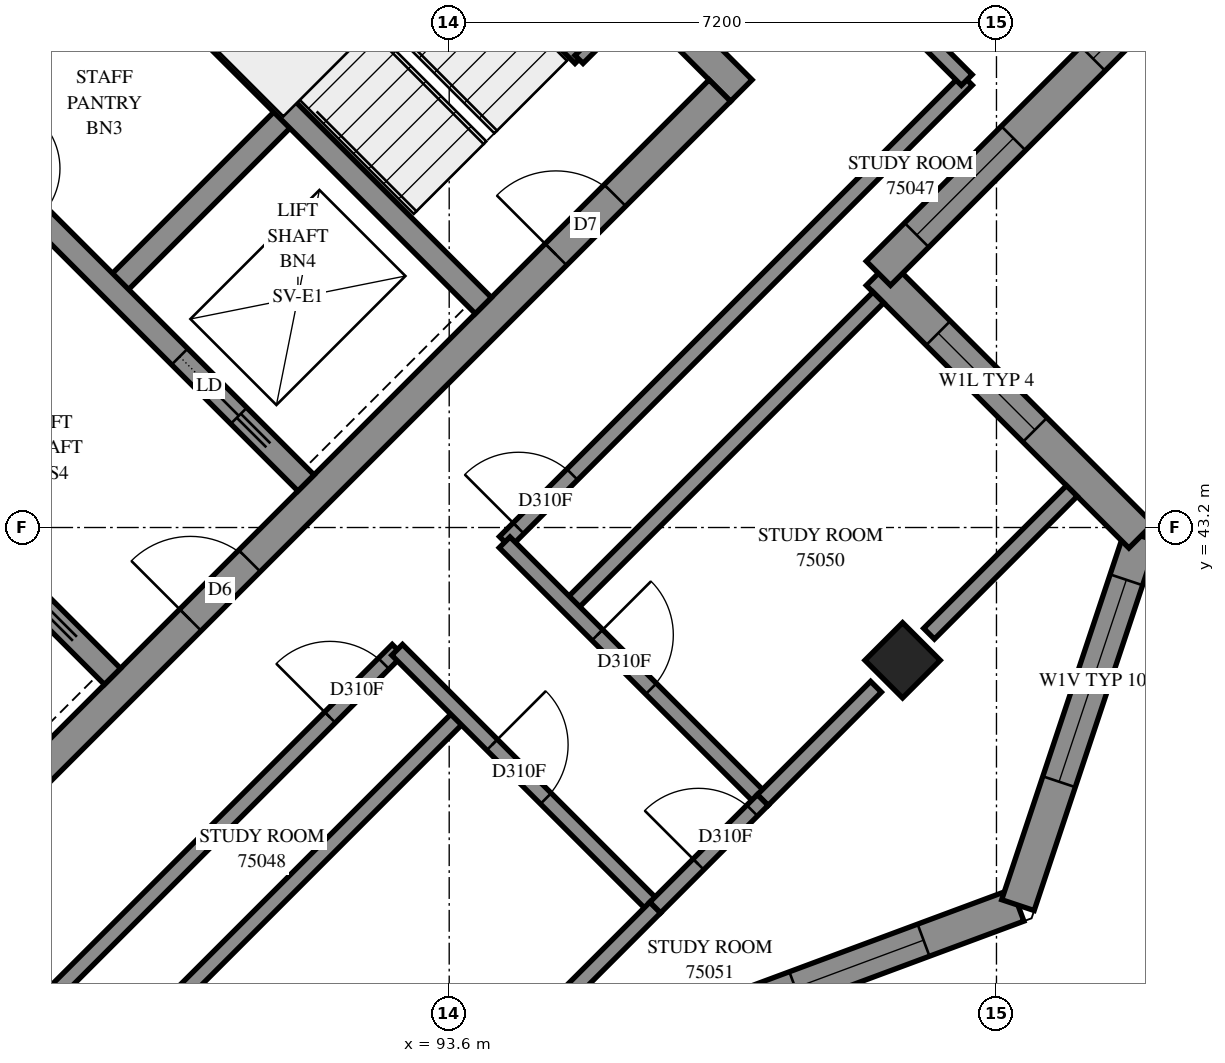
"""IFC4 building model, lengths in metres.
Left out: names, types, materials, properties, quantities, classifications, styles, units other than length and angle.
Written with IfcOpenShell. Run it as: python <this file> out.ifc"""

import sys

from ifc_helpers import new_model, si_unit, direction, frame, frame_2d, origin, origin_2d, place, context, subcontext, project, spatial, polyline, rectangle, outline, extrude, element, fill, save


model = new_model("IFC4")
c1 = context("Model", 3, precision=1e-05, world=origin(), true_north=direction((0.0, 1.0)))
c2 = subcontext(c1, "Body", "Model", "MODEL_VIEW")
j1 = project(units=[si_unit("LENGTHUNIT", "METRE"), si_unit("PLANEANGLEUNIT", "RADIAN")], contexts=[c1])
p1 = place(None, origin())
s1 = spatial("IfcSite", under=j1, at=p1, CompositionType="ELEMENT")
p2 = place(p1, origin())
s2 = spatial("IfcBuilding", under=s1, at=p2, CompositionType="ELEMENT")
p3 = place(p2, frame((0.0, 0.0, 274.4)))
s3 = spatial("IfcBuildingStorey", under=s2, at=p3, CompositionType="ELEMENT", Elevation=274.4)
p4 = place(p3, frame((99.565, 41.453, 0.0), z_axis=(0.0, 0.0, 1.0), x_axis=(0.7071067812, -0.7071067812, 0.0)))
e1 = element("IfcColumn", 1, at=p4, inside=s3, PredefinedType="COLUMN", context=c2, shape_type="SweptSolid", body=[
    extrude(rectangle(XDim=0.7, YDim=0.7, at=origin_2d()), origin(), (0.0, 0.0, 1.0), 3.1),
])
p5 = place(p3, frame((86.695, 59.696, -0.3), z_axis=(0.0, 0.0, 1.0), x_axis=(0.7071100706, -0.7071034917, 0.0)))
e2 = element("IfcWall", 2, at=p5, inside=s3, PredefinedType="SHEAR", context=c2, shape_type="SweptSolid", body=[
    extrude(rectangle(XDim=15.2, YDim=0.4, at=frame_2d((7.6, 0.0))), origin(), (0.0, 0.0, 1.0), 2.7),
])
p6 = place(p5, frame((10.4, 0.0, 0.3)))
e3 = element("IfcOpeningElement", 3, at=p6, cuts=e2, PredefinedType="OPENING", context=c2, shape_type="SweptSolid", body=[
    extrude(rectangle(XDim=0.8, YDim=2.1, at=frame_2d((0.4, 1.05))), frame((0.0, 0.21, 0.0), z_axis=(0.0, -1.0, 0.0), x_axis=(1.0, 0.0, 0.0)), (0.0, 0.0, 1.0), 0.42),
])
p7 = place(p3, frame((86.978, 38.766, -0.3), z_axis=(0.0, 0.0, 1.0), x_axis=(0.7071067812, 0.7071067812, 0.0)))
e4 = element("IfcWall", 4, at=p7, inside=s3, PredefinedType="SHEAR", context=c2, shape_type="SweptSolid", body=[
    extrude(rectangle(XDim=14.4, YDim=0.4, at=frame_2d((7.2, 0.0))), origin(), (0.0, 0.0, 1.0), 2.7),
])
p8 = place(p7, frame((4.55, 0.0, 0.3)))
e5 = element("IfcOpeningElement", 5, at=p8, cuts=e4, PredefinedType="OPENING", context=c2, shape_type="SweptSolid", body=[
    extrude(rectangle(XDim=1.1, YDim=2.1, at=frame_2d((0.55, 1.05))), frame((0.0, 0.21, 0.0), z_axis=(0.0, -1.0, 0.0), x_axis=(1.0, 0.0, 0.0)), (0.0, 0.0, 1.0), 0.42),
])
p9 = place(p7, frame((11.35, 0.0, 0.3)))
e6 = element("IfcOpeningElement", 6, at=p9, cuts=e4, PredefinedType="OPENING", context=c2, shape_type="SweptSolid", body=[
    extrude(rectangle(XDim=1.1, YDim=2.1, at=frame_2d((0.55, 1.05))), frame((0.0, 0.21, 0.0), z_axis=(0.0, -1.0, 0.0), x_axis=(1.0, 0.0, 0.0)), (0.0, 0.0, 1.0), 0.42),
])
for number, where, z_axis, x_axis in (
    (7, (86.625, 48.878, 0.0), (0.0, 0.0, 1.0), (0.707, 0.707, 0.0)),
    (8, (89.17, 46.332, 0.0), (0.0, 0.0, 1.0), (0.707, 0.707, 0.0)),
):
    element("IfcWall", number, at=place(p3, frame(where, z_axis=z_axis, x_axis=x_axis)), inside=s3, PredefinedType="SOLIDWALL", context=c2, shape_type="SweptSolid", body=[
        extrude(rectangle(XDim=3.3, YDim=0.3, at=frame_2d((1.65, 0.0))), origin(), (0.0, 0.0, 1.0), 3.1),
    ])
p10 = place(p3, frame((78.988, 51.423, 0.0), z_axis=(0.0, 0.0, 1.0), x_axis=(0.7071067812, -0.7071067812, 0.0)))
e9 = element("IfcWall", 9, at=p10, inside=s3, PredefinedType="SOLIDWALL", context=c2, shape_type="SweptSolid", body=[
    extrude(rectangle(XDim=14.4, YDim=0.3, at=frame_2d((7.2, 0.0))), origin(), (0.0, 0.0, 1.0), 3.1),
])
p11 = place(p10, frame((1.35, 0.0, 0.0)))
e10 = element("IfcOpeningElement", 10, at=p11, cuts=e9, PredefinedType="OPENING", context=c2, shape_type="SweptSolid", body=[
    extrude(rectangle(XDim=0.9, YDim=2.1, at=frame_2d((0.45, 1.05))), frame((0.0, 0.16, 0.0), z_axis=(0.0, -1.0, 0.0), x_axis=(1.0, 0.0, 0.0)), (0.0, 0.0, 1.0), 0.32),
])
p12 = place(p10, frame((4.95, 0.0, 0.0)))
e11 = element("IfcOpeningElement", 11, at=p12, cuts=e9, PredefinedType="OPENING", context=c2, shape_type="SweptSolid", body=[
    extrude(rectangle(XDim=0.9, YDim=2.1, at=frame_2d((0.45, 1.05))), frame((0.0, 0.16, 0.0), z_axis=(0.0, -1.0, 0.0), x_axis=(1.0, 0.0, 0.0)), (0.0, 0.0, 1.0), 0.32),
])
p13 = place(p10, frame((8.55, 0.0, 0.0)))
e12 = element("IfcOpeningElement", 12, at=p13, cuts=e9, PredefinedType="OPENING", context=c2, shape_type="SweptSolid", body=[
    extrude(rectangle(XDim=0.9, YDim=2.1, at=frame_2d((0.45, 1.05))), frame((0.0, 0.16, 0.0), z_axis=(0.0, -1.0, 0.0), x_axis=(1.0, 0.0, 0.0)), (0.0, 0.0, 1.0), 0.32),
])
p14 = place(p10, frame((12.05, 0.0, 0.0)))
e13 = element("IfcOpeningElement", 13, at=p14, cuts=e9, PredefinedType="OPENING", context=c2, shape_type="SweptSolid", body=[
    extrude(rectangle(XDim=1.1, YDim=2.1, at=frame_2d((0.55, 1.05))), frame((0.0, 0.16, 0.0), z_axis=(0.0, -1.0, 0.0), x_axis=(1.0, 0.0, 0.0)), (0.0, 0.0, 1.0), 0.32),
])
p15 = place(p3, frame((81.534, 53.969, 0.0), z_axis=(0.0, 0.0, 1.0), x_axis=(0.707103309, -0.7071102534, 0.0)))
e14 = element("IfcWall", 14, at=p15, inside=s3, PredefinedType="SOLIDWALL", context=c2, shape_type="SweptSolid", body=[
    extrude(rectangle(XDim=14.4, YDim=0.3, at=frame_2d((7.2, 0.0))), origin(), (0.0, 0.0, 1.0), 3.1),
])
p16 = place(p15, frame((8.55, 0.0, 0.0)))
e15 = element("IfcOpeningElement", 15, at=p16, cuts=e14, PredefinedType="OPENING", context=c2, shape_type="SweptSolid", body=[
    extrude(rectangle(XDim=0.9, YDim=2.1, at=frame_2d((0.45, 1.05))), frame((0.0, 0.16, 0.0), z_axis=(0.0, -1.0, 0.0), x_axis=(1.0, 0.0, 0.0)), (0.0, 0.0, 1.0), 0.32),
])
p17 = place(p15, frame((1.25, 0.0, 0.0)))
e16 = element("IfcOpeningElement", 16, at=p17, cuts=e14, PredefinedType="OPENING", context=c2, shape_type="SweptSolid", body=[
    extrude(rectangle(XDim=1.1, YDim=2.1, at=frame_2d((0.55, 1.05))), frame((0.0, 0.16, 0.0), z_axis=(0.0, -1.0, 0.0), x_axis=(1.0, 0.0, 0.0)), (0.0, 0.0, 1.0), 0.32),
])
p18 = place(p15, frame((4.85, 0.0, 0.0)))
e17 = element("IfcOpeningElement", 17, at=p18, cuts=e14, PredefinedType="OPENING", context=c2, shape_type="SweptSolid", body=[
    extrude(rectangle(XDim=1.1, YDim=2.1, at=frame_2d((0.55, 1.05))), frame((0.0, 0.16, 0.0), z_axis=(0.0, -1.0, 0.0), x_axis=(1.0, 0.0, 0.0)), (0.0, 0.0, 1.0), 0.32),
])
p19 = place(p15, frame((12.05, 0.0, 0.0)))
e18 = element("IfcOpeningElement", 18, at=p19, cuts=e14, PredefinedType="OPENING", context=c2, shape_type="SweptSolid", body=[
    extrude(rectangle(XDim=1.1, YDim=2.1, at=frame_2d((0.55, 1.05))), frame((0.0, 0.16, 0.0), z_axis=(0.0, -1.0, 0.0), x_axis=(1.0, 0.0, 0.0)), (0.0, 0.0, 1.0), 0.32),
])
p20 = place(p3, frame((88.958, 51.211, 0.0), z_axis=(0.0, 0.0, 1.0), x_axis=(0.7070998367, -0.7071137256, 0.0)))
e19 = element("IfcWall", 19, at=p20, inside=s3, PredefinedType="SOLIDWALL", context=c2, shape_type="SweptSolid", body=[
    extrude(rectangle(XDim=7.2, YDim=0.3, at=frame_2d((3.6, 0.0))), origin(), (0.0, 0.0, 1.0), 3.1),
])
p21 = place(p3, frame((96.137, 36.395, 0.0), z_axis=(0.0, 0.0, 1.0), x_axis=(0.937429161, 0.3481760591, 0.0)))
e20 = element("IfcWall", 20, at=p21, inside=s3, PredefinedType="SOLIDWALL", context=c2, shape_type="SweptSolid", body=[
    extrude(outline(polyline([(0.103, -0.225), (5.383, -0.225), (5.168, 0.225), (-0.103, 0.225), (0.103, -0.225)])), origin(), (0.0, 0.0, 1.0), 3.1),
])
p22 = place(p21, frame((2.151, 0.0, 0.7)))
e21 = element("IfcOpeningElement", 21, at=p22, cuts=e20, PredefinedType="OPENING", context=c2, shape_type="SweptSolid", body=[
    extrude(rectangle(XDim=1.8, YDim=1.8, at=frame_2d((0.9, 0.9))), frame((0.0, 0.235, 0.0), z_axis=(0.0, -1.0, 0.0), x_axis=(1.0, 0.0, 0.0)), (0.0, 0.0, 1.0), 0.47),
])
p23 = place(p3, frame((101.082, 38.232, 0.0), z_axis=(0.0, 0.0, 1.0), x_axis=(0.316227766, 0.9486832981, 0.0)))
e22 = element("IfcWall", 22, at=p23, inside=s3, PredefinedType="SOLIDWALL", context=c2, shape_type="SweptSolid", body=[
    extrude(outline(polyline([(-0.108, -0.225), (5.259, -0.225), (4.981, 0.225), (0.108, 0.225), (-0.108, -0.225)])), origin(), (0.0, 0.0, 1.0), 3.1),
])
p24 = place(p23, frame((1.711, 0.0, 0.45)))
e23 = element("IfcOpeningElement", 23, at=p24, cuts=e22, PredefinedType="OPENING", context=c2, shape_type="SweptSolid", body=[
    extrude(rectangle(XDim=2.8, YDim=2.55, at=frame_2d((1.4, 1.275))), frame((0.0, 0.235, 0.0), z_axis=(0.0, -1.0, 0.0), x_axis=(1.0, 0.0, 0.0)), (0.0, 0.0, 1.0), 0.47),
])
p25 = place(p3, frame((102.701, 43.089, 0.0), z_axis=(0.0, 0.0, 1.0), x_axis=(-0.7070965479, 0.7071170144, 0.0)))
e24 = element("IfcWall", 24, at=p25, inside=s3, PredefinedType="SOLIDWALL", context=c2, shape_type="SweptSolid", body=[
    extrude(outline(polyline([(-0.139, -0.225), (4.661, -0.225), (5.111, 0.225), (0.139, 0.225), (-0.139, -0.225)])), origin(), (0.0, 0.0, 1.0), 3.1),
])
p26 = place(p25, frame((1.974, 0.0, 0.6)))
e25 = element("IfcOpeningElement", 25, at=p26, cuts=e24, PredefinedType="OPENING", context=c2, shape_type="SweptSolid", body=[
    extrude(rectangle(XDim=1.8, YDim=1.9, at=frame_2d((0.9, 0.95))), frame((0.0, 0.235, 0.0), z_axis=(0.0, -1.0, 0.0), x_axis=(1.0, 0.0, 0.0)), (0.0, 0.0, 1.0), 0.47),
])
p27 = place(p3, frame((99.246, 46.544, 0.0), z_axis=(0.0, 0.0, 1.0), x_axis=(0.7071067812, 0.7071067812, 0.0)))
e26 = element("IfcWall", 26, at=p27, inside=s3, PredefinedType="SOLIDWALL", context=c2, shape_type="SweptSolid", body=[
    extrude(outline(polyline([(0.225, -0.225), (6.197, -0.225), (5.562, 0.225), (-0.225, 0.225), (0.225, -0.225)])), origin(), (0.0, 0.0, 1.0), 3.1),
])
p28 = place(p27, frame((0.713, 0.0, 0.6)))
e27 = element("IfcOpeningElement", 27, at=p28, cuts=e26, PredefinedType="OPENING", context=c2, shape_type="SweptSolid", body=[
    extrude(rectangle(XDim=1.8, YDim=1.9, at=frame_2d((0.9, 0.95))), frame((0.0, 0.235, 0.0), z_axis=(0.0, -1.0, 0.0), x_axis=(1.0, 0.0, 0.0)), (0.0, 0.0, 1.0), 0.47),
])
p29 = place(p27, frame((3.994, 0.0, 0.6)))
e28 = element("IfcOpeningElement", 28, at=p29, cuts=e26, PredefinedType="OPENING", context=c2, shape_type="SweptSolid", body=[
    extrude(rectangle(XDim=1.2, YDim=1.9, at=frame_2d((0.6, 0.95))), frame((0.0, 0.235, 0.0), z_axis=(0.0, -1.0, 0.0), x_axis=(1.0, 0.0, 0.0)), (0.0, 0.0, 1.0), 0.47),
])
p30 = place(p3, frame((91.313, 53.354, 0.0), z_axis=(0.0, 0.0, 1.0), x_axis=(0.7071067812, -0.7071067812, 0.0)))
e29 = element("IfcWall", 29, at=p30, inside=s3, PredefinedType="PARTITIONING", context=c2, shape_type="SweptSolid", body=[
    extrude(rectangle(XDim=5.65, YDim=0.15, at=frame_2d((2.825, 0.0))), origin(), (0.0, 0.0, 1.0), 3.1),
])
p31 = place(p3, frame((95.308, 49.358, 0.0), z_axis=(0.0, 0.0, 1.0), x_axis=(0.70705776, 0.707155799, 0.0)))
e30 = element("IfcWall", 30, at=p31, inside=s3, PredefinedType="PARTITIONING", context=c2, shape_type="SweptSolid", body=[
    extrude(rectangle(XDim=1.02, YDim=0.15, at=frame_2d((0.51, 0.0))), origin(), (0.0, 0.0, 1.0), 3.1),
])
p32 = place(p3, frame((86.306, 33.287, 0.0), z_axis=(0.0, 0.0, 1.0), x_axis=(0.7071020418, 0.7071115206, 0.0)))
e31 = element("IfcWall", 31, at=p32, inside=s3, PredefinedType="PARTITIONING", context=c2, shape_type="SweptSolid", body=[
    extrude(rectangle(XDim=10.55, YDim=0.2, at=frame_2d((5.275, 0.0))), origin(), (0.0, 0.0, 1.0), 3.1),
])
p33 = place(p3, frame((86.839, 35.511, 0.0), z_axis=(0.0, 0.0, 1.0), x_axis=(0.707223053, 0.7069904903, 0.0)))
e32 = element("IfcWall", 32, at=p33, inside=s3, PredefinedType="PARTITIONING", context=c2, shape_type="SweptSolid", body=[
    extrude(rectangle(XDim=8.6, YDim=0.2, at=frame_2d((4.3, 0.0))), origin(), (0.0, 0.0, 1.0), 3.1),
])
p34 = place(p33, frame((7.343, 0.0, 0.0)))
e33 = element("IfcOpeningElement", 33, at=p34, cuts=e32, PredefinedType="OPENING", context=c2, shape_type="SweptSolid", body=[
    extrude(rectangle(XDim=1.0, YDim=2.1, at=frame_2d((0.5, 1.05))), frame((0.0, 0.11, 0.0), z_axis=(0.0, -1.0, 0.0), x_axis=(1.0, 0.0, 0.0)), (0.0, 0.0, 1.0), 0.22),
])
p35 = place(p3, frame((94.332, 43.01, 0.0), z_axis=(0.0, 0.0, 1.0), x_axis=(0.7071067812, 0.7071067812, 0.0)))
e34 = element("IfcWall", 34, at=p35, inside=s3, PredefinedType="PARTITIONING", context=c2, shape_type="SweptSolid", body=[
    extrude(rectangle(XDim=8.598, YDim=0.2, at=frame_2d((4.299, 0.0))), origin(), (0.0, 0.0, 1.0), 3.1),
])
p36 = place(p35, frame((0.255, 0.0, 0.0)))
e35 = element("IfcOpeningElement", 35, at=p36, cuts=e34, PredefinedType="OPENING", context=c2, shape_type="SweptSolid", body=[
    extrude(rectangle(XDim=1.0, YDim=2.1, at=frame_2d((0.5, 1.05))), frame((0.0, 0.11, 0.0), z_axis=(0.0, -1.0, 0.0), x_axis=(1.0, 0.0, 0.0)), (0.0, 0.0, 1.0), 0.22),
])
p37 = place(p3, frame((96.167, 53.329, 0.0), z_axis=(0.0, 0.0, 1.0), x_axis=(0.7071067812, -0.7071067812, 0.0)))
e36 = element("IfcWall", 36, at=p37, inside=s3, PredefinedType="PARTITIONING", context=c2, shape_type="SweptSolid", body=[
    extrude(rectangle(XDim=5.999, YDim=0.2, at=frame_2d((3.0, 0.0))), origin(), (0.0, 0.0, 1.0), 3.1),
])
p38 = place(p3, frame((95.179, 42.161, 0.0), z_axis=(0.0, 0.0, 1.0), x_axis=(0.707115476, 0.7070980863, 0.0)))
e37 = element("IfcWall", 37, at=p38, inside=s3, PredefinedType="PARTITIONING", context=c2, shape_type="SweptSolid", body=[
    extrude(rectangle(XDim=5.75, YDim=0.2, at=frame_2d((2.875, 0.0))), origin(), (0.0, 0.0, 1.0), 3.1),
])
p39 = place(p3, frame((92.915, 41.591, 0.0), z_axis=(0.0, 0.0, 1.0), x_axis=(0.7071067812, -0.7071067812, 0.0)))
e38 = element("IfcWall", 38, at=p39, inside=s3, PredefinedType="PARTITIONING", context=c2, shape_type="SweptSolid", body=[
    extrude(rectangle(XDim=4.8, YDim=0.2, at=frame_2d((2.4, 0.0))), origin(), (0.0, 0.0, 1.0), 3.1),
])
p40 = place(p39, frame((1.767, 0.0, 0.0)))
e39 = element("IfcOpeningElement", 39, at=p40, cuts=e38, PredefinedType="OPENING", context=c2, shape_type="SweptSolid", body=[
    extrude(rectangle(XDim=1.0, YDim=2.1, at=frame_2d((0.5, 1.05))), frame((0.0, 0.11, 0.0), z_axis=(0.0, -1.0, 0.0), x_axis=(1.0, 0.0, 0.0)), (0.0, 0.0, 1.0), 0.22),
])
p41 = place(p3, frame((94.329, 43.005, 0.0), z_axis=(0.0, 0.0, 1.0), x_axis=(0.7071067812, -0.7071067812, 0.0)))
e40 = element("IfcWall", 40, at=p41, inside=s3, PredefinedType="PARTITIONING", context=c2, shape_type="SweptSolid", body=[
    extrude(rectangle(XDim=4.8, YDim=0.2, at=frame_2d((2.4, 0.0))), origin(), (0.0, 0.0, 1.0), 3.1),
])
p42 = place(p41, frame((1.725, 0.0, 0.0)))
e41 = element("IfcOpeningElement", 41, at=p42, cuts=e40, PredefinedType="OPENING", context=c2, shape_type="SweptSolid", body=[
    extrude(rectangle(XDim=1.0, YDim=2.1, at=frame_2d((0.5, 1.05))), frame((0.0, 0.11, 0.0), z_axis=(0.0, -1.0, 0.0), x_axis=(1.0, 0.0, 0.0)), (0.0, 0.0, 1.0), 0.22),
])
p43 = place(p3, frame((99.913, 41.803, 0.0), z_axis=(0.0, 0.0, 1.0), x_axis=(0.7071067812, 0.7071067812, 0.0)))
e42 = element("IfcWall", 42, at=p43, inside=s3, PredefinedType="PARTITIONING", context=c2, shape_type="SweptSolid", body=[
    extrude(rectangle(XDim=2.656, YDim=0.2, at=frame_2d((1.328, 0.0))), origin(), (0.0, 0.0, 1.0), 3.1),
])
p44 = place(p3, frame((97.725, 39.615, 0.0), z_axis=(0.0, 0.0, 1.0), x_axis=(0.7071067812, 0.7071067812, 0.0)))
e43 = element("IfcWall", 43, at=p44, inside=s3, PredefinedType="PARTITIONING", context=c2, shape_type="SweptSolid", body=[
    extrude(rectangle(XDim=2.107, YDim=0.2, at=frame_2d((1.054, 0.0))), origin(), (0.0, 0.0, 1.0), 2.6),
])
p45 = place(p3, frame((94.823, 36.713, 0.0), z_axis=(0.0, 0.0, 1.0), x_axis=(0.7071067812, 0.7071067812, 0.0)))
e44 = element("IfcWall", 44, at=p45, inside=s3, PredefinedType="PARTITIONING", context=c2, shape_type="SweptSolid", body=[
    extrude(rectangle(XDim=2.104, YDim=0.2, at=frame_2d((1.052, 0.0))), origin(), (0.0, 0.0, 1.0), 2.6),
])
p46 = place(p3, frame((96.311, 38.201, 0.0), z_axis=(0.0, 0.0, 1.0), x_axis=(0.7071067812, 0.7071067812, 0.0)))
e45 = element("IfcWall", 45, at=p46, inside=s3, PredefinedType="PARTITIONING", context=c2, shape_type="SweptSolid", body=[
    extrude(rectangle(XDim=2.0, YDim=0.2, at=frame_2d((1.0, 0.0))), origin(), (0.0, 0.0, 1.0), 2.6),
])
p47 = place(p46, frame((0.803, 0.0, 0.0)))
e46 = element("IfcOpeningElement", 46, at=p47, cuts=e45, PredefinedType="OPENING", context=c2, shape_type="SweptSolid", body=[
    extrude(rectangle(XDim=1.0, YDim=2.1, at=frame_2d((0.5, 1.05))), frame((0.0, 0.11, 0.0), z_axis=(0.0, -1.0, 0.0), x_axis=(1.0, 0.0, 0.0)), (0.0, 0.0, 1.0), 0.22),
])
p48 = place(p22, origin())
e47 = element("IfcWindow", 47, at=p48, inside=s3, PartitioningType="SINGLE_PANEL", PredefinedType="WINDOW", context=c2, shape_type="SweptSolid", body=[
    extrude(rectangle(XDim=1.8, YDim=1.8, at=frame_2d((0.9, 0.9))), frame((0.0, 0.205, 0.0), z_axis=(0.0, -1.0, 0.0), x_axis=(1.0, 0.0, 0.0)), (0.0, 0.0, 1.0), 0.06),
])
fill(e21, e47)
p49 = place(p24, origin())
e48 = element("IfcWindow", 48, at=p49, inside=s3, PartitioningType="SINGLE_PANEL", PredefinedType="WINDOW", context=c2, shape_type="SweptSolid", body=[
    extrude(rectangle(XDim=2.8, YDim=2.55, at=frame_2d((1.4, 1.275))), frame((0.0, 0.205, 0.0), z_axis=(0.0, -1.0, 0.0), x_axis=(1.0, 0.0, 0.0)), (0.0, 0.0, 1.0), 0.06),
])
fill(e23, e48)
p50 = place(p26, origin())
e49 = element("IfcWindow", 49, at=p50, inside=s3, PartitioningType="SINGLE_PANEL", PredefinedType="WINDOW", context=c2, shape_type="SweptSolid", body=[
    extrude(rectangle(XDim=1.8, YDim=1.9, at=frame_2d((0.9, 0.95))), frame((0.0, 0.205, 0.0), z_axis=(0.0, -1.0, 0.0), x_axis=(1.0, 0.0, 0.0)), (0.0, 0.0, 1.0), 0.06),
])
fill(e25, e49)
p51 = place(p28, origin())
e50 = element("IfcWindow", 50, at=p51, inside=s3, PartitioningType="SINGLE_PANEL", PredefinedType="WINDOW", context=c2, shape_type="SweptSolid", body=[
    extrude(rectangle(XDim=1.8, YDim=1.9, at=frame_2d((0.9, 0.95))), frame((0.0, 0.205, 0.0), z_axis=(0.0, -1.0, 0.0), x_axis=(1.0, 0.0, 0.0)), (0.0, 0.0, 1.0), 0.06),
])
fill(e27, e50)
p52 = place(p8, origin())
e51 = element("IfcDoor", 51, at=p52, inside=s3, OperationType="DOUBLE_DOOR_SINGLE_SWING", PredefinedType="DOOR", context=c2, shape_type="SweptSolid", body=[
    extrude(rectangle(XDim=1.1, YDim=2.1, at=frame_2d((0.55, 1.05))), frame((0.0, 0.025, 0.0), z_axis=(0.0, -1.0, 0.0), x_axis=(1.0, 0.0, 0.0)), (0.0, 0.0, 1.0), 0.05),
])
fill(e5, e51)
p53 = place(p9, origin())
e52 = element("IfcDoor", 52, at=p53, inside=s3, OperationType="SINGLE_SWING_RIGHT", PredefinedType="DOOR", context=c2, shape_type="SweptSolid", body=[
    extrude(rectangle(XDim=1.1, YDim=2.1, at=frame_2d((0.55, 1.05))), frame((0.0, 0.025, 0.0), z_axis=(0.0, -1.0, 0.0), x_axis=(1.0, 0.0, 0.0)), (0.0, 0.0, 1.0), 0.05),
])
fill(e6, e52)
p54 = place(p19, origin())
e53 = element("IfcDoor", 53, at=p54, inside=s3, OperationType="SLIDING_TO_RIGHT", PredefinedType="DOOR", context=c2, shape_type="SweptSolid", body=[
    extrude(rectangle(XDim=1.1, YDim=2.1, at=frame_2d((0.55, 1.05))), frame((0.0, 0.025, 0.0), z_axis=(0.0, -1.0, 0.0), x_axis=(1.0, 0.0, 0.0)), (0.0, 0.0, 1.0), 0.05),
])
fill(e18, e53)
p55 = place(p36, origin())
e54 = element("IfcDoor", 54, at=p55, inside=s3, OperationType="SINGLE_SWING_RIGHT", PredefinedType="DOOR", context=c2, shape_type="SweptSolid", body=[
    extrude(rectangle(XDim=1.0, YDim=2.1, at=frame_2d((0.5, 1.05))), frame((0.0, 0.025, 0.0), z_axis=(0.0, -1.0, 0.0), x_axis=(1.0, 0.0, 0.0)), (0.0, 0.0, 1.0), 0.05),
])
fill(e35, e54)
p56 = place(p34, origin())
e55 = element("IfcDoor", 55, at=p56, inside=s3, OperationType="SINGLE_SWING_RIGHT", PredefinedType="DOOR", context=c2, shape_type="SweptSolid", body=[
    extrude(rectangle(XDim=1.0, YDim=2.1, at=frame_2d((0.5, 1.05))), frame((0.0, 0.025, 0.0), z_axis=(0.0, -1.0, 0.0), x_axis=(1.0, 0.0, 0.0)), (0.0, 0.0, 1.0), 0.05),
])
fill(e33, e55)
p57 = place(p40, origin())
e56 = element("IfcDoor", 56, at=p57, inside=s3, OperationType="SINGLE_SWING_LEFT", PredefinedType="DOOR", context=c2, shape_type="SweptSolid", body=[
    extrude(rectangle(XDim=1.0, YDim=2.1, at=frame_2d((0.5, 1.05))), frame((0.0, 0.025, 0.0), z_axis=(0.0, -1.0, 0.0), x_axis=(1.0, 0.0, 0.0)), (0.0, 0.0, 1.0), 0.05),
])
fill(e39, e56)
p58 = place(p42, origin())
e57 = element("IfcDoor", 57, at=p58, inside=s3, OperationType="SINGLE_SWING_RIGHT", PredefinedType="DOOR", context=c2, shape_type="SweptSolid", body=[
    extrude(rectangle(XDim=1.0, YDim=2.1, at=frame_2d((0.5, 1.05))), frame((0.0, 0.025, 0.0), z_axis=(0.0, -1.0, 0.0), x_axis=(1.0, 0.0, 0.0)), (0.0, 0.0, 1.0), 0.05),
])
fill(e41, e57)
p59 = place(p47, origin())
e58 = element("IfcDoor", 58, at=p59, inside=s3, OperationType="SINGLE_SWING_RIGHT", PredefinedType="DOOR", context=c2, shape_type="SweptSolid", body=[
    extrude(rectangle(XDim=1.0, YDim=2.1, at=frame_2d((0.5, 1.05))), frame((0.0, 0.025, 0.0), z_axis=(0.0, -1.0, 0.0), x_axis=(1.0, 0.0, 0.0)), (0.0, 0.0, 1.0), 0.05),
])
fill(e46, e58)
save(model, sys.argv[1])
